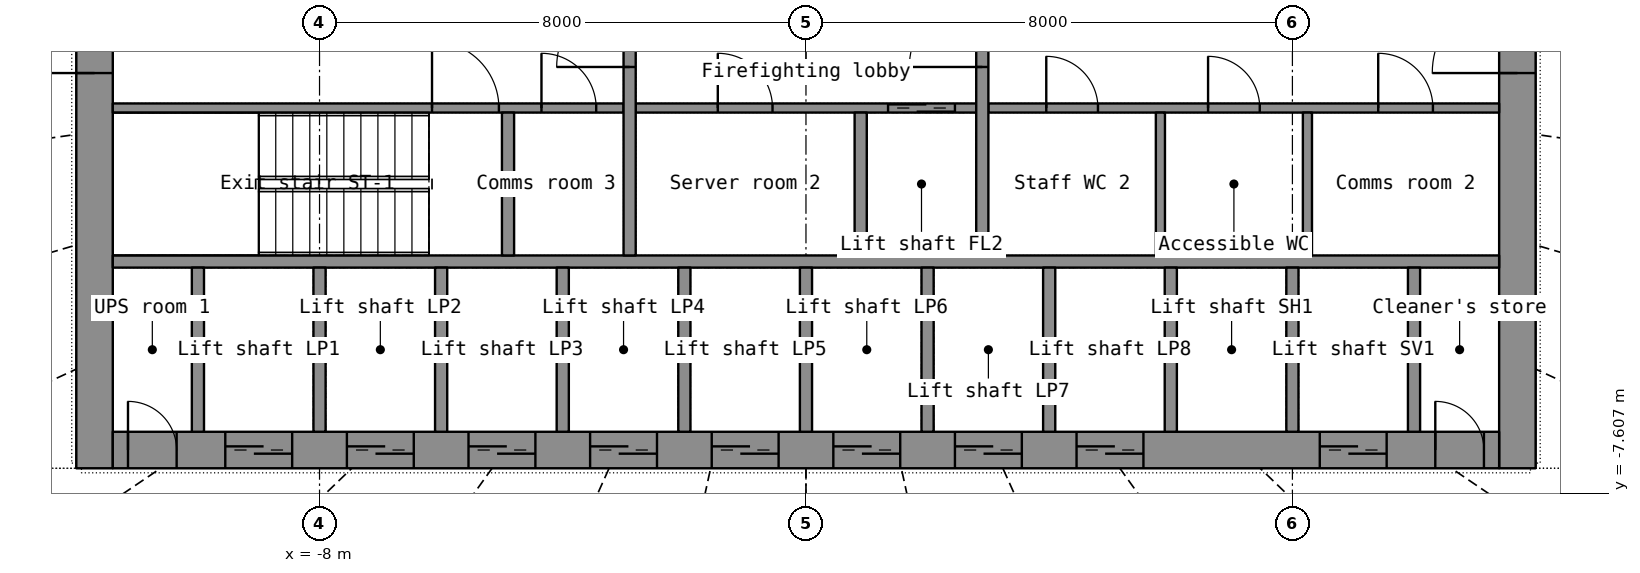
"""IFC4 building model, lengths in metres.
Left out: names, types, materials, properties, quantities, classifications, styles, units other than length and angle.
Written with IfcOpenShell. Run it as: python <this file> out.ifc"""

import sys

from ifc_helpers import new_model, si_unit, direction, frame, frame_2d, origin, place, context, subcontext, project, spatial, rectangle, extrude, element, fill, save


model = new_model("IFC4")
c1 = context("Model", 3, precision=1e-05, world=origin(), true_north=direction((0.0, 1.0)))
c2 = subcontext(c1, "Body", "Model", "MODEL_VIEW")
j1 = project(units=[si_unit("LENGTHUNIT", "METRE"), si_unit("PLANEANGLEUNIT", "RADIAN")], contexts=[c1])
p1 = place(None, origin())
s1 = spatial("IfcSite", under=j1, at=p1, CompositionType="ELEMENT")
p2 = place(p1, origin())
s2 = spatial("IfcBuilding", under=s1, at=p2, CompositionType="ELEMENT")
p3 = place(p2, frame((0.0, 0.0, 37.1)))
s3 = spatial("IfcBuildingStorey", under=s2, at=p3, CompositionType="ELEMENT", Elevation=37.1)
p4 = place(p3, frame((-11.7, -7.2, 0.0), z_axis=(0.0, 0.0, 1.0), x_axis=(0.0, 1.0, 0.0)))
e1 = element("IfcWall", 1, at=p4, inside=s3, PredefinedType="SHEAR", context=c2, shape_type="SweptSolid", body=[
    extrude(rectangle(XDim=14.4, YDim=0.6, at=frame_2d((7.2, 0.0))), origin(), (0.0, 0.0, 1.0), 3.3),
])
p5 = place(p4, frame((6.5, 0.0, 0.0)))
e2 = element("IfcOpeningElement", 2, at=p5, cuts=e1, PredefinedType="OPENING", context=c2, shape_type="SweptSolid", body=[
    extrude(rectangle(XDim=1.4, YDim=2.2, at=frame_2d((0.7, 1.1))), frame((0.0, 0.31, 0.0), z_axis=(0.0, -1.0, 0.0), x_axis=(1.0, 0.0, 0.0)), (0.0, 0.0, 1.0), 0.62),
])
p6 = place(p3, frame((11.7, -7.2, 0.0), z_axis=(0.0, 0.0, 1.0), x_axis=(0.0, 1.0, 0.0)))
e3 = element("IfcWall", 3, at=p6, inside=s3, PredefinedType="SHEAR", context=c2, shape_type="SweptSolid", body=[
    extrude(rectangle(XDim=14.4, YDim=0.6, at=frame_2d((7.2, 0.0))), origin(), (0.0, 0.0, 1.0), 3.3),
])
p7 = place(p6, frame((6.5, 0.0, 0.0)))
e4 = element("IfcOpeningElement", 4, at=p7, cuts=e3, PredefinedType="OPENING", context=c2, shape_type="SweptSolid", body=[
    extrude(rectangle(XDim=1.4, YDim=2.2, at=frame_2d((0.7, 1.1))), frame((0.0, 0.31, 0.0), z_axis=(0.0, -1.0, 0.0), x_axis=(1.0, 0.0, 0.0)), (0.0, 0.0, 1.0), 0.62),
])
p8 = place(p3, frame((-11.4, -6.9, 0.0), z_axis=(0.0, 0.0, 1.0), x_axis=(1.0, 0.0, 0.0)))
e5 = element("IfcWall", 5, at=p8, inside=s3, PredefinedType="SHEAR", context=c2, shape_type="SweptSolid", body=[
    extrude(rectangle(XDim=22.8, YDim=0.6, at=frame_2d((11.4, 0.0))), origin(), (0.0, 0.0, 1.0), 3.3),
])
p9 = place(p8, frame((1.85, 0.0, 0.0)))
e6 = element("IfcOpeningElement", 6, at=p9, cuts=e5, PredefinedType="OPENING", context=c2, shape_type="SweptSolid", body=[
    extrude(rectangle(XDim=1.1, YDim=2.2, at=frame_2d((0.55, 1.1))), frame((0.0, 0.31, 0.0), z_axis=(0.0, -1.0, 0.0), x_axis=(1.0, 0.0, 0.0)), (0.0, 0.0, 1.0), 0.62),
])
p10 = place(p8, frame((3.85, 0.0, 0.0)))
e7 = element("IfcOpeningElement", 7, at=p10, cuts=e5, PredefinedType="OPENING", context=c2, shape_type="SweptSolid", body=[
    extrude(rectangle(XDim=1.1, YDim=2.2, at=frame_2d((0.55, 1.1))), frame((0.0, 0.31, 0.0), z_axis=(0.0, -1.0, 0.0), x_axis=(1.0, 0.0, 0.0)), (0.0, 0.0, 1.0), 0.62),
])
p11 = place(p8, frame((5.85, 0.0, 0.0)))
e8 = element("IfcOpeningElement", 8, at=p11, cuts=e5, PredefinedType="OPENING", context=c2, shape_type="SweptSolid", body=[
    extrude(rectangle(XDim=1.1, YDim=2.2, at=frame_2d((0.55, 1.1))), frame((0.0, 0.31, 0.0), z_axis=(0.0, -1.0, 0.0), x_axis=(1.0, 0.0, 0.0)), (0.0, 0.0, 1.0), 0.62),
])
p12 = place(p8, frame((7.85, 0.0, 0.0)))
e9 = element("IfcOpeningElement", 9, at=p12, cuts=e5, PredefinedType="OPENING", context=c2, shape_type="SweptSolid", body=[
    extrude(rectangle(XDim=1.1, YDim=2.2, at=frame_2d((0.55, 1.1))), frame((0.0, 0.31, 0.0), z_axis=(0.0, -1.0, 0.0), x_axis=(1.0, 0.0, 0.0)), (0.0, 0.0, 1.0), 0.62),
])
p13 = place(p8, frame((9.85, 0.0, 0.0)))
e10 = element("IfcOpeningElement", 10, at=p13, cuts=e5, PredefinedType="OPENING", context=c2, shape_type="SweptSolid", body=[
    extrude(rectangle(XDim=1.1, YDim=2.2, at=frame_2d((0.55, 1.1))), frame((0.0, 0.31, 0.0), z_axis=(0.0, -1.0, 0.0), x_axis=(1.0, 0.0, 0.0)), (0.0, 0.0, 1.0), 0.62),
])
p14 = place(p8, frame((11.85, 0.0, 0.0)))
e11 = element("IfcOpeningElement", 11, at=p14, cuts=e5, PredefinedType="OPENING", context=c2, shape_type="SweptSolid", body=[
    extrude(rectangle(XDim=1.1, YDim=2.2, at=frame_2d((0.55, 1.1))), frame((0.0, 0.31, 0.0), z_axis=(0.0, -1.0, 0.0), x_axis=(1.0, 0.0, 0.0)), (0.0, 0.0, 1.0), 0.62),
])
p15 = place(p8, frame((13.85, 0.0, 0.0)))
e12 = element("IfcOpeningElement", 12, at=p15, cuts=e5, PredefinedType="OPENING", context=c2, shape_type="SweptSolid", body=[
    extrude(rectangle(XDim=1.1, YDim=2.2, at=frame_2d((0.55, 1.1))), frame((0.0, 0.31, 0.0), z_axis=(0.0, -1.0, 0.0), x_axis=(1.0, 0.0, 0.0)), (0.0, 0.0, 1.0), 0.62),
])
p16 = place(p8, frame((15.85, 0.0, 0.0)))
e13 = element("IfcOpeningElement", 13, at=p16, cuts=e5, PredefinedType="OPENING", context=c2, shape_type="SweptSolid", body=[
    extrude(rectangle(XDim=1.1, YDim=2.2, at=frame_2d((0.55, 1.1))), frame((0.0, 0.31, 0.0), z_axis=(0.0, -1.0, 0.0), x_axis=(1.0, 0.0, 0.0)), (0.0, 0.0, 1.0), 0.62),
])
p17 = place(p8, frame((19.85, 0.0, 0.0)))
e14 = element("IfcOpeningElement", 14, at=p17, cuts=e5, PredefinedType="OPENING", context=c2, shape_type="SweptSolid", body=[
    extrude(rectangle(XDim=1.1, YDim=2.2, at=frame_2d((0.55, 1.1))), frame((0.0, 0.31, 0.0), z_axis=(0.0, -1.0, 0.0), x_axis=(1.0, 0.0, 0.0)), (0.0, 0.0, 1.0), 0.62),
])
p18 = place(p8, frame((0.25, 0.0, 0.0)))
e15 = element("IfcOpeningElement", 15, at=p18, cuts=e5, PredefinedType="OPENING", context=c2, shape_type="SweptSolid", body=[
    extrude(rectangle(XDim=0.8, YDim=2.05, at=frame_2d((0.4, 1.025))), frame((0.0, 0.31, 0.0), z_axis=(0.0, -1.0, 0.0), x_axis=(1.0, 0.0, 0.0)), (0.0, 0.0, 1.0), 0.62),
])
p19 = place(p8, frame((21.75, 0.0, 0.0)))
e16 = element("IfcOpeningElement", 16, at=p19, cuts=e5, PredefinedType="OPENING", context=c2, shape_type="SweptSolid", body=[
    extrude(rectangle(XDim=0.8, YDim=2.05, at=frame_2d((0.4, 1.025))), frame((0.0, 0.31, 0.0), z_axis=(0.0, -1.0, 0.0), x_axis=(1.0, 0.0, 0.0)), (0.0, 0.0, 1.0), 0.62),
])
p20 = place(p3, frame((-11.4, -3.8, 0.0), z_axis=(0.0, 0.0, 1.0), x_axis=(1.0, 0.0, 0.0)))
e17 = element("IfcWall", 17, at=p20, inside=s3, PredefinedType="SHEAR", context=c2, shape_type="SweptSolid", body=[
    extrude(rectangle(XDim=22.8, YDim=0.2, at=frame_2d((11.4, 0.0))), origin(), (0.0, 0.0, 1.0), 3.3),
])
for number, where, z_axis, x_axis in (
    (18, (-10.0, -6.6, 0.0), (0.0, 0.0, 1.0), (0.0, 1.0, 0.0)),
    (19, (-8.0, -6.6, 0.0), (0.0, 0.0, 1.0), (0.0, 1.0, 0.0)),
    (20, (-6.0, -6.6, 0.0), (0.0, 0.0, 1.0), (0.0, 1.0, 0.0)),
    (21, (-4.0, -6.6, 0.0), (0.0, 0.0, 1.0), (0.0, 1.0, 0.0)),
    (22, (-2.0, -6.6, 0.0), (0.0, 0.0, 1.0), (0.0, 1.0, 0.0)),
    (23, (0.0, -6.6, 0.0), (0.0, 0.0, 1.0), (0.0, 1.0, 0.0)),
    (24, (2.0, -6.6, 0.0), (0.0, 0.0, 1.0), (0.0, 1.0, 0.0)),
    (25, (4.0, -6.6, 0.0), (0.0, 0.0, 1.0), (0.0, 1.0, 0.0)),
    (26, (6.0, -6.6, 0.0), (0.0, 0.0, 1.0), (0.0, 1.0, 0.0)),
    (27, (8.0, -6.6, 0.0), (0.0, 0.0, 1.0), (0.0, 1.0, 0.0)),
    (28, (10.0, -6.6, 0.0), (0.0, 0.0, 1.0), (0.0, 1.0, 0.0)),
):
    element("IfcWall", number, at=place(p3, frame(where, z_axis=z_axis, x_axis=x_axis)), inside=s3, PredefinedType="SHEAR", context=c2, shape_type="SweptSolid", body=[
        extrude(rectangle(XDim=2.7, YDim=0.2, at=frame_2d((1.35, 0.0))), origin(), (0.0, 0.0, 1.0), 3.3),
    ])
p21 = place(p3, frame((-11.4, -1.275, 0.0), z_axis=(0.0, 0.0, 1.0), x_axis=(1.0, 0.0, 0.0)))
e29 = element("IfcWall", 29, at=p21, inside=s3, PredefinedType="SHEAR", context=c2, shape_type="SweptSolid", body=[
    extrude(rectangle(XDim=8.4, YDim=0.15, at=frame_2d((4.2, 0.0))), origin(), (0.0, 0.0, 1.0), 3.3),
])
p22 = place(p21, frame((5.25, 0.0, 0.0)))
e30 = element("IfcOpeningElement", 30, at=p22, cuts=e29, PredefinedType="OPENING", context=c2, shape_type="SweptSolid", body=[
    extrude(rectangle(XDim=1.1, YDim=2.15, at=frame_2d((0.55, 1.075))), frame((0.0, 0.085, 0.0), z_axis=(0.0, -1.0, 0.0), x_axis=(1.0, 0.0, 0.0)), (0.0, 0.0, 1.0), 0.17),
])
p23 = place(p21, frame((7.05, 0.0, 0.0)))
e31 = element("IfcOpeningElement", 31, at=p23, cuts=e29, PredefinedType="OPENING", context=c2, shape_type="SweptSolid", body=[
    extrude(rectangle(XDim=0.9, YDim=2.1, at=frame_2d((0.45, 1.05))), frame((0.0, 0.085, 0.0), z_axis=(0.0, -1.0, 0.0), x_axis=(1.0, 0.0, 0.0)), (0.0, 0.0, 1.0), 0.17),
])
p24 = place(p3, frame((-2.8, -1.275, 0.0), z_axis=(0.0, 0.0, 1.0), x_axis=(1.0, 0.0, 0.0)))
e32 = element("IfcWall", 32, at=p24, inside=s3, PredefinedType="SHEAR", context=c2, shape_type="SweptSolid", body=[
    extrude(rectangle(XDim=5.6, YDim=0.15, at=frame_2d((2.8, 0.0))), origin(), (0.0, 0.0, 1.0), 3.3),
])
p25 = place(p24, frame((4.15, 0.0, 0.0)))
e33 = element("IfcOpeningElement", 33, at=p25, cuts=e32, PredefinedType="OPENING", context=c2, shape_type="SweptSolid", body=[
    extrude(rectangle(XDim=1.1, YDim=2.2, at=frame_2d((0.55, 1.1))), frame((0.0, 0.085, 0.0), z_axis=(0.0, -1.0, 0.0), x_axis=(1.0, 0.0, 0.0)), (0.0, 0.0, 1.0), 0.17),
])
p26 = place(p24, frame((1.35, 0.0, 0.0)))
e34 = element("IfcOpeningElement", 34, at=p26, cuts=e32, PredefinedType="OPENING", context=c2, shape_type="SweptSolid", body=[
    extrude(rectangle(XDim=0.9, YDim=2.1, at=frame_2d((0.45, 1.05))), frame((0.0, 0.085, 0.0), z_axis=(0.0, -1.0, 0.0), x_axis=(1.0, 0.0, 0.0)), (0.0, 0.0, 1.0), 0.17),
])
p27 = place(p3, frame((3.0, -1.275, 0.0), z_axis=(0.0, 0.0, 1.0), x_axis=(1.0, 0.0, 0.0)))
e35 = element("IfcWall", 35, at=p27, inside=s3, PredefinedType="PARTITIONING", context=c2, shape_type="SweptSolid", body=[
    extrude(rectangle(XDim=8.4, YDim=0.15, at=frame_2d((4.2, 0.0))), origin(), (0.0, 0.0, 1.0), 3.3),
])
p28 = place(p27, frame((0.952, 0.0, 0.0)))
e36 = element("IfcOpeningElement", 36, at=p28, cuts=e35, PredefinedType="OPENING", context=c2, shape_type="SweptSolid", body=[
    extrude(rectangle(XDim=0.85, YDim=2.1, at=frame_2d((0.425, 1.05))), frame((0.0, 0.085, 0.0), z_axis=(0.0, -1.0, 0.0), x_axis=(1.0, 0.0, 0.0)), (0.0, 0.0, 1.0), 0.17),
])
p29 = place(p27, frame((3.613, 0.0, 0.0)))
e37 = element("IfcOpeningElement", 37, at=p29, cuts=e35, PredefinedType="OPENING", context=c2, shape_type="SweptSolid", body=[
    extrude(rectangle(XDim=0.85, YDim=2.1, at=frame_2d((0.425, 1.05))), frame((0.0, 0.085, 0.0), z_axis=(0.0, -1.0, 0.0), x_axis=(1.0, 0.0, 0.0)), (0.0, 0.0, 1.0), 0.17),
])
p30 = place(p27, frame((6.411, 0.0, 0.0)))
e38 = element("IfcOpeningElement", 38, at=p30, cuts=e35, PredefinedType="OPENING", context=c2, shape_type="SweptSolid", body=[
    extrude(rectangle(XDim=0.9, YDim=2.1, at=frame_2d((0.45, 1.05))), frame((0.0, 0.085, 0.0), z_axis=(0.0, -1.0, 0.0), x_axis=(1.0, 0.0, 0.0)), (0.0, 0.0, 1.0), 0.17),
])
p31 = place(p3, frame((-2.9, -3.7, 0.0), z_axis=(0.0, 0.0, 1.0), x_axis=(0.0, 1.0, 0.0)))
e39 = element("IfcWall", 39, at=p31, inside=s3, PredefinedType="SHEAR", context=c2, shape_type="SweptSolid", body=[
    extrude(rectangle(XDim=7.4, YDim=0.2, at=frame_2d((3.7, 0.0))), origin(), (0.0, 0.0, 1.0), 3.3),
])
p32 = place(p31, frame((3.1, 0.0, 0.0)))
e40 = element("IfcOpeningElement", 40, at=p32, cuts=e39, PredefinedType="OPENING", context=c2, shape_type="SweptSolid", body=[
    extrude(rectangle(XDim=1.2, YDim=2.2, at=frame_2d((0.6, 1.1))), frame((0.0, 0.11, 0.0), z_axis=(0.0, -1.0, 0.0), x_axis=(1.0, 0.0, 0.0)), (0.0, 0.0, 1.0), 0.22),
])
p33 = place(p3, frame((2.9, -3.7, 0.0), z_axis=(0.0, 0.0, 1.0), x_axis=(0.0, 1.0, 0.0)))
e41 = element("IfcWall", 41, at=p33, inside=s3, PredefinedType="SHEAR", context=c2, shape_type="SweptSolid", body=[
    extrude(rectangle(XDim=7.4, YDim=0.2, at=frame_2d((3.7, 0.0))), origin(), (0.0, 0.0, 1.0), 3.3),
])
p34 = place(p33, frame((3.1, 0.0, 0.0)))
e42 = element("IfcOpeningElement", 42, at=p34, cuts=e41, PredefinedType="OPENING", context=c2, shape_type="SweptSolid", body=[
    extrude(rectangle(XDim=1.2, YDim=2.2, at=frame_2d((0.6, 1.1))), frame((0.0, 0.11, 0.0), z_axis=(0.0, -1.0, 0.0), x_axis=(1.0, 0.0, 0.0)), (0.0, 0.0, 1.0), 0.22),
])
for number, where, z_axis, x_axis in (
    (43, (0.9, -3.7, 0.0), (0.0, 0.0, 1.0), (0.0, 1.0, 0.0)),
    (44, (-4.9, -3.7, 0.0), (0.0, 0.0, 1.0), (0.0, 1.0, 0.0)),
):
    element("IfcWall", number, at=place(p3, frame(where, z_axis=z_axis, x_axis=x_axis)), inside=s3, PredefinedType="SHEAR", context=c2, shape_type="SweptSolid", body=[
        extrude(rectangle(XDim=2.35, YDim=0.2, at=frame_2d((1.175, 0.0))), origin(), (0.0, 0.0, 1.0), 3.3),
    ])
for number, where, z_axis, x_axis in (
    (45, (5.829, -3.7, 0.0), (0.0, 0.0, 1.0), (0.0, 1.0, 0.0)),
    (46, (8.247, -3.7, 0.0), (0.0, 0.0, 1.0), (0.0, 1.0, 0.0)),
):
    element("IfcWall", number, at=place(p3, frame(where, z_axis=z_axis, x_axis=x_axis)), inside=s3, PredefinedType="PARTITIONING", context=c2, shape_type="SweptSolid", body=[
        extrude(rectangle(XDim=2.35, YDim=0.15, at=frame_2d((1.175, 0.0))), origin(), (0.0, 0.0, 1.0), 3.3),
    ])
p35 = place(p9, origin())
e47 = element("IfcDoor", 47, at=p35, inside=s3, OperationType="DOUBLE_DOOR_SLIDING", PredefinedType="DOOR", context=c2, shape_type="SweptSolid", body=[
    extrude(rectangle(XDim=1.1, YDim=2.2, at=frame_2d((0.55, 1.1))), frame((0.0, 0.025, 0.0), z_axis=(0.0, -1.0, 0.0), x_axis=(1.0, 0.0, 0.0)), (0.0, 0.0, 1.0), 0.05),
])
fill(e6, e47)
p36 = place(p10, origin())
e48 = element("IfcDoor", 48, at=p36, inside=s3, OperationType="DOUBLE_DOOR_SLIDING", PredefinedType="DOOR", context=c2, shape_type="SweptSolid", body=[
    extrude(rectangle(XDim=1.1, YDim=2.2, at=frame_2d((0.55, 1.1))), frame((0.0, 0.025, 0.0), z_axis=(0.0, -1.0, 0.0), x_axis=(1.0, 0.0, 0.0)), (0.0, 0.0, 1.0), 0.05),
])
fill(e7, e48)
p37 = place(p11, origin())
e49 = element("IfcDoor", 49, at=p37, inside=s3, OperationType="DOUBLE_DOOR_SLIDING", PredefinedType="DOOR", context=c2, shape_type="SweptSolid", body=[
    extrude(rectangle(XDim=1.1, YDim=2.2, at=frame_2d((0.55, 1.1))), frame((0.0, 0.025, 0.0), z_axis=(0.0, -1.0, 0.0), x_axis=(1.0, 0.0, 0.0)), (0.0, 0.0, 1.0), 0.05),
])
fill(e8, e49)
p38 = place(p12, origin())
e50 = element("IfcDoor", 50, at=p38, inside=s3, OperationType="DOUBLE_DOOR_SLIDING", PredefinedType="DOOR", context=c2, shape_type="SweptSolid", body=[
    extrude(rectangle(XDim=1.1, YDim=2.2, at=frame_2d((0.55, 1.1))), frame((0.0, 0.025, 0.0), z_axis=(0.0, -1.0, 0.0), x_axis=(1.0, 0.0, 0.0)), (0.0, 0.0, 1.0), 0.05),
])
fill(e9, e50)
p39 = place(p13, origin())
e51 = element("IfcDoor", 51, at=p39, inside=s3, OperationType="DOUBLE_DOOR_SLIDING", PredefinedType="DOOR", context=c2, shape_type="SweptSolid", body=[
    extrude(rectangle(XDim=1.1, YDim=2.2, at=frame_2d((0.55, 1.1))), frame((0.0, 0.025, 0.0), z_axis=(0.0, -1.0, 0.0), x_axis=(1.0, 0.0, 0.0)), (0.0, 0.0, 1.0), 0.05),
])
fill(e10, e51)
p40 = place(p14, origin())
e52 = element("IfcDoor", 52, at=p40, inside=s3, OperationType="DOUBLE_DOOR_SLIDING", PredefinedType="DOOR", context=c2, shape_type="SweptSolid", body=[
    extrude(rectangle(XDim=1.1, YDim=2.2, at=frame_2d((0.55, 1.1))), frame((0.0, 0.025, 0.0), z_axis=(0.0, -1.0, 0.0), x_axis=(1.0, 0.0, 0.0)), (0.0, 0.0, 1.0), 0.05),
])
fill(e11, e52)
p41 = place(p15, origin())
e53 = element("IfcDoor", 53, at=p41, inside=s3, OperationType="DOUBLE_DOOR_SLIDING", PredefinedType="DOOR", context=c2, shape_type="SweptSolid", body=[
    extrude(rectangle(XDim=1.1, YDim=2.2, at=frame_2d((0.55, 1.1))), frame((0.0, 0.025, 0.0), z_axis=(0.0, -1.0, 0.0), x_axis=(1.0, 0.0, 0.0)), (0.0, 0.0, 1.0), 0.05),
])
fill(e12, e53)
p42 = place(p16, origin())
e54 = element("IfcDoor", 54, at=p42, inside=s3, OperationType="DOUBLE_DOOR_SLIDING", PredefinedType="DOOR", context=c2, shape_type="SweptSolid", body=[
    extrude(rectangle(XDim=1.1, YDim=2.2, at=frame_2d((0.55, 1.1))), frame((0.0, 0.025, 0.0), z_axis=(0.0, -1.0, 0.0), x_axis=(1.0, 0.0, 0.0)), (0.0, 0.0, 1.0), 0.05),
])
fill(e13, e54)
p43 = place(p17, origin())
e55 = element("IfcDoor", 55, at=p43, inside=s3, OperationType="DOUBLE_DOOR_SLIDING", PredefinedType="DOOR", context=c2, shape_type="SweptSolid", body=[
    extrude(rectangle(XDim=1.1, YDim=2.2, at=frame_2d((0.55, 1.1))), frame((0.0, 0.025, 0.0), z_axis=(0.0, -1.0, 0.0), x_axis=(1.0, 0.0, 0.0)), (0.0, 0.0, 1.0), 0.05),
])
fill(e14, e55)
p44 = place(p18, origin())
e56 = element("IfcDoor", 56, at=p44, inside=s3, OperationType="SINGLE_SWING_LEFT", PredefinedType="DOOR", context=c2, shape_type="SweptSolid", body=[
    extrude(rectangle(XDim=0.8, YDim=2.05, at=frame_2d((0.4, 1.025))), frame((0.0, 0.025, 0.0), z_axis=(0.0, -1.0, 0.0), x_axis=(1.0, 0.0, 0.0)), (0.0, 0.0, 1.0), 0.05),
])
fill(e15, e56)
p45 = place(p19, origin())
e57 = element("IfcDoor", 57, at=p45, inside=s3, OperationType="SINGLE_SWING_LEFT", PredefinedType="DOOR", context=c2, shape_type="SweptSolid", body=[
    extrude(rectangle(XDim=0.8, YDim=2.05, at=frame_2d((0.4, 1.025))), frame((0.0, 0.025, 0.0), z_axis=(0.0, -1.0, 0.0), x_axis=(1.0, 0.0, 0.0)), (0.0, 0.0, 1.0), 0.05),
])
fill(e16, e57)
p46 = place(p5, origin())
e58 = element("IfcDoor", 58, at=p46, inside=s3, OperationType="DOUBLE_DOOR_SINGLE_SWING", PredefinedType="DOOR", context=c2, shape_type="SweptSolid", body=[
    extrude(rectangle(XDim=1.4, YDim=2.2, at=frame_2d((0.7, 1.1))), frame((0.0, 0.025, 0.0), z_axis=(0.0, -1.0, 0.0), x_axis=(1.0, 0.0, 0.0)), (0.0, 0.0, 1.0), 0.05),
])
fill(e2, e58)
p47 = place(p7, origin())
e59 = element("IfcDoor", 59, at=p47, inside=s3, OperationType="DOUBLE_DOOR_SINGLE_SWING", PredefinedType="DOOR", context=c2, shape_type="SweptSolid", body=[
    extrude(rectangle(XDim=1.4, YDim=2.2, at=frame_2d((0.7, 1.1))), frame((0.0, 0.025, 0.0), z_axis=(0.0, -1.0, 0.0), x_axis=(1.0, 0.0, 0.0)), (0.0, 0.0, 1.0), 0.05),
])
fill(e4, e59)
p48 = place(p32, origin())
e60 = element("IfcDoor", 60, at=p48, inside=s3, OperationType="SINGLE_SWING_LEFT", PredefinedType="DOOR", context=c2, shape_type="SweptSolid", body=[
    extrude(rectangle(XDim=1.2, YDim=2.2, at=frame_2d((0.6, 1.1))), frame((0.0, 0.025, 0.0), z_axis=(0.0, -1.0, 0.0), x_axis=(1.0, 0.0, 0.0)), (0.0, 0.0, 1.0), 0.05),
])
fill(e40, e60)
p49 = place(p34, origin())
e61 = element("IfcDoor", 61, at=p49, inside=s3, OperationType="SINGLE_SWING_LEFT", PredefinedType="DOOR", context=c2, shape_type="SweptSolid", body=[
    extrude(rectangle(XDim=1.2, YDim=2.2, at=frame_2d((0.6, 1.1))), frame((0.0, 0.025, 0.0), z_axis=(0.0, -1.0, 0.0), x_axis=(1.0, 0.0, 0.0)), (0.0, 0.0, 1.0), 0.05),
])
fill(e42, e61)
p50 = place(p25, origin())
e62 = element("IfcDoor", 62, at=p50, inside=s3, OperationType="DOUBLE_DOOR_SLIDING", PredefinedType="DOOR", context=c2, shape_type="SweptSolid", body=[
    extrude(rectangle(XDim=1.1, YDim=2.2, at=frame_2d((0.55, 1.1))), frame((0.0, 0.025, 0.0), z_axis=(0.0, -1.0, 0.0), x_axis=(1.0, 0.0, 0.0)), (0.0, 0.0, 1.0), 0.05),
])
fill(e33, e62)
p51 = place(p22, origin())
e63 = element("IfcDoor", 63, at=p51, inside=s3, OperationType="SINGLE_SWING_LEFT", PredefinedType="DOOR", context=c2, shape_type="SweptSolid", body=[
    extrude(rectangle(XDim=1.1, YDim=2.15, at=frame_2d((0.55, 1.075))), frame((0.0, 0.025, 0.0), z_axis=(0.0, -1.0, 0.0), x_axis=(1.0, 0.0, 0.0)), (0.0, 0.0, 1.0), 0.05),
])
fill(e30, e63)
p52 = place(p28, origin())
e64 = element("IfcDoor", 64, at=p52, inside=s3, OperationType="SINGLE_SWING_LEFT", PredefinedType="DOOR", context=c2, shape_type="SweptSolid", body=[
    extrude(rectangle(XDim=0.85, YDim=2.1, at=frame_2d((0.425, 1.05))), frame((0.0, 0.025, 0.0), z_axis=(0.0, -1.0, 0.0), x_axis=(1.0, 0.0, 0.0)), (0.0, 0.0, 1.0), 0.05),
])
fill(e36, e64)
p53 = place(p29, origin())
e65 = element("IfcDoor", 65, at=p53, inside=s3, OperationType="SINGLE_SWING_LEFT", PredefinedType="DOOR", context=c2, shape_type="SweptSolid", body=[
    extrude(rectangle(XDim=0.85, YDim=2.1, at=frame_2d((0.425, 1.05))), frame((0.0, 0.025, 0.0), z_axis=(0.0, -1.0, 0.0), x_axis=(1.0, 0.0, 0.0)), (0.0, 0.0, 1.0), 0.05),
])
fill(e37, e65)
p54 = place(p30, origin())
e66 = element("IfcDoor", 66, at=p54, inside=s3, OperationType="SINGLE_SWING_LEFT", PredefinedType="DOOR", context=c2, shape_type="SweptSolid", body=[
    extrude(rectangle(XDim=0.9, YDim=2.1, at=frame_2d((0.45, 1.05))), frame((0.0, 0.025, 0.0), z_axis=(0.0, -1.0, 0.0), x_axis=(1.0, 0.0, 0.0)), (0.0, 0.0, 1.0), 0.05),
])
fill(e38, e66)
p55 = place(p26, origin())
e67 = element("IfcDoor", 67, at=p55, inside=s3, OperationType="SINGLE_SWING_LEFT", PredefinedType="DOOR", context=c2, shape_type="SweptSolid", body=[
    extrude(rectangle(XDim=0.9, YDim=2.1, at=frame_2d((0.45, 1.05))), frame((0.0, 0.025, 0.0), z_axis=(0.0, -1.0, 0.0), x_axis=(1.0, 0.0, 0.0)), (0.0, 0.0, 1.0), 0.05),
])
fill(e34, e67)
p56 = place(p23, origin())
e68 = element("IfcDoor", 68, at=p56, inside=s3, OperationType="SINGLE_SWING_LEFT", PredefinedType="DOOR", context=c2, shape_type="SweptSolid", body=[
    extrude(rectangle(XDim=0.9, YDim=2.1, at=frame_2d((0.45, 1.05))), frame((0.0, 0.025, 0.0), z_axis=(0.0, -1.0, 0.0), x_axis=(1.0, 0.0, 0.0)), (0.0, 0.0, 1.0), 0.05),
])
fill(e31, e68)
save(model, sys.argv[1])
